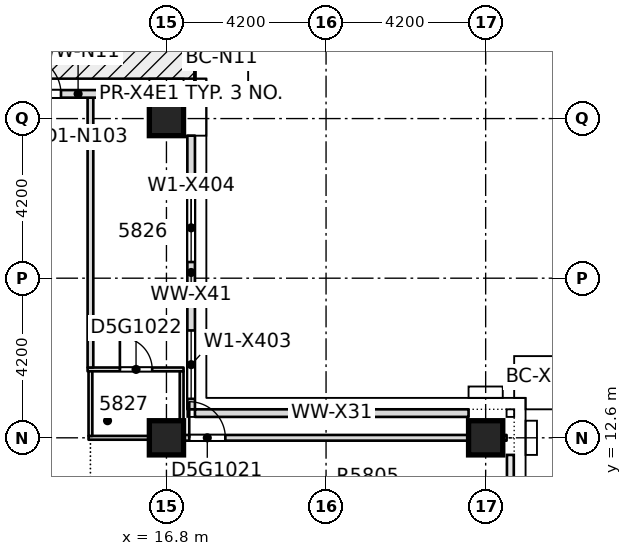
"""IFC4 building model, lengths in metres.
Left out: names, types, materials, properties, quantities, classifications, styles, units other than length and angle.
Written with IfcOpenShell. Run it as: python <this file> out.ifc"""

import sys

from ifc_helpers import new_model, si_unit, direction, frame, frame_2d, origin, origin_2d, place, context, subcontext, project, spatial, rectangle, extrude, element, fill, save


model = new_model("IFC4")
c1 = context("Model", 3, precision=1e-05, world=origin(), true_north=direction((0.0, 1.0)))
c2 = subcontext(c1, "Body", "Model", "MODEL_VIEW")
j1 = project(units=[si_unit("LENGTHUNIT", "METRE"), si_unit("PLANEANGLEUNIT", "RADIAN")], contexts=[c1])
p1 = place(None, origin())
s1 = spatial("IfcSite", under=j1, at=p1, CompositionType="ELEMENT")
p2 = place(p1, origin())
s2 = spatial("IfcBuilding", under=s1, at=p2, CompositionType="ELEMENT")
p3 = place(p2, frame((0.0, 0.0, 223.45)))
s3 = spatial("IfcBuildingStorey", under=s2, at=p3, CompositionType="ELEMENT", Elevation=223.45)
for number, where, z_axis, x_axis in (
    (1, (16.8, 12.6, -0.4), (0.0, 0.0, 1.0), (1.0, 0.0, 0.0)),
    (2, (25.2, 12.6, -0.4), (0.0, 0.0, 1.0), (1.0, 0.0, 0.0)),
    (3, (16.8, 21.0, -0.4), (0.0, 0.0, 1.0), (1.0, 0.0, 0.0)),
):
    element("IfcColumn", number, at=place(p3, frame(where, z_axis=z_axis, x_axis=x_axis)), inside=s3, PredefinedType="COLUMN", context=c2, shape_type="SweptSolid", body=[
        extrude(rectangle(XDim=0.9, YDim=0.9, at=origin_2d()), origin(), (0.0, 0.0, 1.0), 3.45),
    ])
p4 = place(p3, frame((14.75, 12.6, 0.0), z_axis=(0.0, 0.0, 1.0), x_axis=(1.0, 0.0, 0.0)))
e4 = element("IfcWall", 4, at=p4, inside=s3, PredefinedType="PARTITIONING", context=c2, shape_type="SweptSolid", body=[
    extrude(rectangle(XDim=2.5, YDim=0.1, at=frame_2d((1.25, 0.0))), origin(), (0.0, 0.0, 1.0), 3.05),
])
p5 = place(p3, frame((17.15, 12.6, 0.0), z_axis=(0.0, 0.0, 1.0), x_axis=(1.0, 0.0, 0.0)))
e5 = element("IfcWall", 5, at=p5, inside=s3, PredefinedType="PARTITIONING", context=c2, shape_type="SweptSolid", body=[
    extrude(rectangle(XDim=0.1, YDim=0.15, at=frame_2d((0.05, 0.0))), origin(), (0.0, 0.0, 1.0), 3.05),
])
p6 = place(p3, frame((14.725, 14.4, 0.0), z_axis=(0.0, 0.0, 1.0), x_axis=(1.0, 0.0, 0.0)))
e6 = element("IfcWall", 6, at=p6, inside=s3, PredefinedType="PARTITIONING", context=c2, shape_type="SweptSolid", body=[
    extrude(rectangle(XDim=2.525, YDim=0.1, at=frame_2d((1.262, 0.0))), origin(), (0.0, 0.0, 1.0), 3.05),
])
p7 = place(p6, frame((0.85, 0.0, 0.0)))
e7 = element("IfcOpeningElement", 7, at=p7, cuts=e6, PredefinedType="OPENING", context=c2, shape_type="SweptSolid", body=[
    extrude(rectangle(XDim=0.85, YDim=2.1, at=frame_2d((0.425, 1.05))), frame((0.0, 0.06, 0.0), z_axis=(0.0, -1.0, 0.0), x_axis=(1.0, 0.0, 0.0)), (0.0, 0.0, 1.0), 0.12),
])
p8 = place(p3, frame((14.8, 12.65, 0.0), z_axis=(0.0, 0.0, 1.0), x_axis=(0.0, 1.0, 0.0)))
e8 = element("IfcWall", 8, at=p8, inside=s3, PredefinedType="PARTITIONING", context=c2, shape_type="SweptSolid", body=[
    extrude(rectangle(XDim=1.7, YDim=0.1, at=frame_2d((0.85, 0.0))), origin(), (0.0, 0.0, 1.0), 3.05),
])
p9 = place(p3, frame((14.8, 14.45, 0.0), z_axis=(0.0, 0.0, 1.0), x_axis=(0.0, 1.0, 0.0)))
e9 = element("IfcWall", 9, at=p9, inside=s3, PredefinedType="PARTITIONING", context=c2, shape_type="SweptSolid", body=[
    extrude(rectangle(XDim=7.1, YDim=0.15, at=frame_2d((3.55, 0.0))), origin(), (0.0, 0.0, 1.0), 3.05),
])
p10 = place(p3, frame((17.2, 12.675, 0.0), z_axis=(0.0, 0.0, 1.0), x_axis=(0.0, 1.0, 0.0)))
e10 = element("IfcWall", 10, at=p10, inside=s3, PredefinedType="PARTITIONING", context=c2, shape_type="SweptSolid", body=[
    extrude(rectangle(XDim=1.675, YDim=0.1, at=frame_2d((0.837, 0.0))), origin(), (0.0, 0.0, 1.0), 3.05),
])
p11 = place(p3, frame((24.75, 13.25, 0.0), z_axis=(0.0, 0.0, 1.0), x_axis=(-1.0, 0.0, 0.0)))
e11 = element("IfcWall", 11, at=p11, inside=s3, PredefinedType="STANDARD", context=c2, shape_type="SweptSolid", body=[
    extrude(rectangle(XDim=7.2, YDim=0.2, at=frame_2d((3.6, 0.0))), origin(), (0.0, 0.0, 1.0), 3.05),
])
p12 = place(p3, frame((17.45, 13.35, 0.0), z_axis=(0.0, 0.0, 1.0), x_axis=(0.0, 1.0, 0.0)))
e12 = element("IfcWall", 12, at=p12, inside=s3, PredefinedType="STANDARD", context=c2, shape_type="SweptSolid", body=[
    extrude(rectangle(XDim=7.2, YDim=0.2, at=frame_2d((3.6, 0.0))), origin(), (0.0, 0.0, 1.0), 3.05),
])
p13 = place(p12, frame((0.275, 0.0, 0.2)))
e13 = element("IfcOpeningElement", 13, at=p13, cuts=e12, PredefinedType="OPENING", context=c2, shape_type="SweptSolid", body=[
    extrude(rectangle(XDim=1.8, YDim=2.65, at=frame_2d((0.9, 1.325))), frame((0.0, 0.11, 0.0), z_axis=(0.0, -1.0, 0.0), x_axis=(1.0, 0.0, 0.0)), (0.0, 0.0, 1.0), 0.22),
])
p14 = place(p12, frame((3.875, 0.0, 0.2)))
e14 = element("IfcOpeningElement", 14, at=p14, cuts=e12, PredefinedType="OPENING", context=c2, shape_type="SweptSolid", body=[
    extrude(rectangle(XDim=1.8, YDim=2.65, at=frame_2d((0.9, 1.325))), frame((0.0, 0.11, 0.0), z_axis=(0.0, -1.0, 0.0), x_axis=(1.0, 0.0, 0.0)), (0.0, 0.0, 1.0), 0.22),
])
p15 = place(p3, frame((16.35, 21.65, 0.0), z_axis=(0.0, 0.0, 1.0), x_axis=(-1.0, 0.0, 0.0)))
e15 = element("IfcWall", 15, at=p15, inside=s3, PredefinedType="STANDARD", context=c2, shape_type="SweptSolid", body=[
    extrude(rectangle(XDim=3.75, YDim=0.2, at=frame_2d((1.875, 0.0))), origin(), (0.0, 0.0, 1.0), 3.05),
])
p16 = place(p15, frame((2.325, 0.0, 0.0)))
e16 = element("IfcOpeningElement", 16, at=p16, cuts=e15, PredefinedType="OPENING", context=c2, shape_type="SweptSolid", body=[
    extrude(rectangle(XDim=1.0, YDim=2.4, at=frame_2d((0.5, 1.2))), frame((0.0, 0.11, 0.0), z_axis=(0.0, -1.0, 0.0), x_axis=(1.0, 0.0, 0.0)), (0.0, 0.0, 1.0), 0.22),
])
p17 = place(p3, frame((17.25, 12.6, 0.0), z_axis=(0.0, 0.0, 1.0), x_axis=(1.0, 0.0, 0.0)))
e17 = element("IfcWall", 17, at=p17, inside=s3, PredefinedType="PARTITIONING", context=c2, shape_type="SweptSolid", body=[
    extrude(rectangle(XDim=7.5, YDim=0.15, at=frame_2d((3.75, 0.0))), origin(), (0.0, 0.0, 1.0), 2.5),
])
p18 = place(p17, frame((0.15, 0.0, 0.0)))
e18 = element("IfcOpeningElement", 18, at=p18, cuts=e17, PredefinedType="OPENING", context=c2, shape_type="SweptSolid", body=[
    extrude(rectangle(XDim=0.95, YDim=2.1, at=frame_2d((0.475, 1.05))), frame((0.0, 0.085, 0.0), z_axis=(0.0, -1.0, 0.0), x_axis=(1.0, 0.0, 0.0)), (0.0, 0.0, 1.0), 0.17),
])
p19 = place(p3, frame((24.75, 12.6, 0.0), z_axis=(0.0, 0.0, 1.0), x_axis=(1.0, 0.0, 0.0)))
e19 = element("IfcWall", 19, at=p19, inside=s3, PredefinedType="PARTITIONING", context=c2, shape_type="SweptSolid", body=[
    extrude(rectangle(XDim=1.0, YDim=0.15, at=frame_2d((0.5, 0.0))), origin(), (0.0, 0.0, 1.0), 3.05),
])
p20 = place(p18, origin())
e20 = element("IfcDoor", 20, at=p20, inside=s3, OperationType="SINGLE_SWING_LEFT", PredefinedType="DOOR", context=c2, shape_type="SweptSolid", body=[
    extrude(rectangle(XDim=0.95, YDim=2.1, at=frame_2d((0.475, 1.05))), frame((0.0, 0.025, 0.0), z_axis=(0.0, -1.0, 0.0), x_axis=(1.0, 0.0, 0.0)), (0.0, 0.0, 1.0), 0.05),
])
fill(e18, e20)
p21 = place(p7, origin())
e21 = element("IfcDoor", 21, at=p21, inside=s3, OperationType="SINGLE_SWING_RIGHT", PredefinedType="DOOR", context=c2, shape_type="SweptSolid", body=[
    extrude(rectangle(XDim=0.85, YDim=2.1, at=frame_2d((0.425, 1.05))), frame((0.0, 0.025, 0.0), z_axis=(0.0, -1.0, 0.0), x_axis=(1.0, 0.0, 0.0)), (0.0, 0.0, 1.0), 0.05),
])
fill(e7, e21)
p22 = place(p13, origin())
e22 = element("IfcWindow", 22, at=p22, inside=s3, PartitioningType="SINGLE_PANEL", PredefinedType="WINDOW", context=c2, shape_type="SweptSolid", body=[
    extrude(rectangle(XDim=1.8, YDim=2.65, at=frame_2d((0.9, 1.325))), frame((0.0, 0.03, 0.0), z_axis=(0.0, -1.0, 0.0), x_axis=(1.0, 0.0, 0.0)), (0.0, 0.0, 1.0), 0.06),
])
fill(e13, e22)
p23 = place(p14, origin())
e23 = element("IfcWindow", 23, at=p23, inside=s3, PartitioningType="SINGLE_PANEL", PredefinedType="WINDOW", context=c2, shape_type="SweptSolid", body=[
    extrude(rectangle(XDim=1.8, YDim=2.65, at=frame_2d((0.9, 1.325))), frame((0.0, 0.03, 0.0), z_axis=(0.0, -1.0, 0.0), x_axis=(1.0, 0.0, 0.0)), (0.0, 0.0, 1.0), 0.06),
])
fill(e14, e23)
p24 = place(p16, origin())
e24 = element("IfcDoor", 24, at=p24, inside=s3, OperationType="SINGLE_SWING_LEFT", PredefinedType="DOOR", context=c2, shape_type="SweptSolid", body=[
    extrude(rectangle(XDim=1.0, YDim=2.4, at=frame_2d((0.5, 1.2))), frame((0.0, 0.025, 0.0), z_axis=(0.0, -1.0, 0.0), x_axis=(1.0, 0.0, 0.0)), (0.0, 0.0, 1.0), 0.05),
])
fill(e16, e24)
save(model, sys.argv[1])
